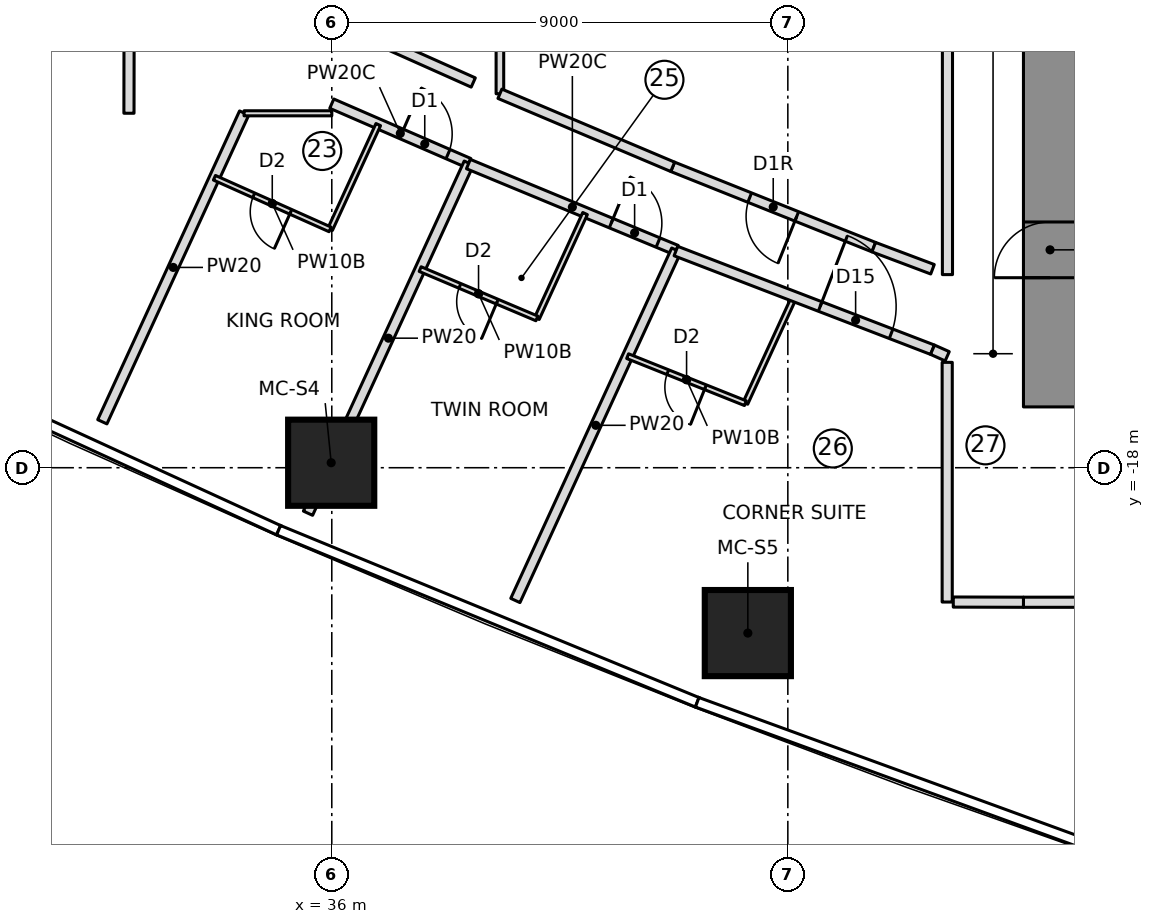
"""IFC4 building model, lengths in metres.
Left out: names, types, materials, properties, quantities, classifications, styles, units other than length and angle.
Written with IfcOpenShell. Run it as: python <this file> out.ifc"""

import sys

from ifc_helpers import new_model, si_unit, direction, frame, frame_2d, origin, origin_2d, place, context, subcontext, project, spatial, rectangle, extrude, element, fill, save


model = new_model("IFC4")
c1 = context("Model", 3, precision=1e-05, world=origin(), true_north=direction((0.0, 1.0)))
c2 = subcontext(c1, "Body", "Model", "MODEL_VIEW")
j1 = project(units=[si_unit("LENGTHUNIT", "METRE"), si_unit("PLANEANGLEUNIT", "RADIAN")], contexts=[c1])
p1 = place(None, origin())
s1 = spatial("IfcSite", under=j1, at=p1, CompositionType="ELEMENT")
p2 = place(p1, origin())
s2 = spatial("IfcBuilding", under=s1, at=p2, CompositionType="ELEMENT")
p3 = place(p2, frame((0.0, 0.0, 84.9)))
s3 = spatial("IfcBuildingStorey", under=s2, at=p3, CompositionType="ELEMENT", Elevation=84.9)
p4 = place(p3, frame((50.175, -16.8, 0.0), z_axis=(0.0, 0.0, 1.0), x_axis=(0.0, 1.0, 0.0)))
e1 = element("IfcWall", 1, at=p4, inside=s3, PredefinedType="SHEAR", context=c2, shape_type="SweptSolid", body=[
    extrude(rectangle(XDim=10.15, YDim=1.05, at=frame_2d((5.075, 0.0))), origin(), (0.0, 0.0, 1.0), 3.55),
])
p5 = place(p4, frame((2.55, 0.0, 0.0)))
e2 = element("IfcOpeningElement", 2, at=p5, cuts=e1, PredefinedType="OPENING", context=c2, shape_type="SweptSolid", body=[
    extrude(rectangle(XDim=1.1, YDim=2.1, at=frame_2d((0.55, 1.05))), frame((0.0, 0.535, 0.0), z_axis=(0.0, -1.0, 0.0), x_axis=(1.0, 0.0, 0.0)), (0.0, 0.0, 1.0), 1.07),
])
for number, where, z_axis, x_axis in (
    (3, (35.988, -17.902, 0.0), (0.0, 0.0, 1.0), (1.0, 0.0, 0.0)),
    (4, (44.211, -21.264, 0.0), (0.0, 0.0, 1.0), (1.0, 0.0, 0.0)),
):
    element("IfcColumn", number, at=place(p3, frame(where, z_axis=z_axis, x_axis=x_axis)), inside=s3, PredefinedType="COLUMN", context=c2, shape_type="SweptSolid", body=[
        extrude(rectangle(XDim=1.7, YDim=1.7, at=origin_2d()), origin(), (0.0, 0.0, 1.0), 3.55),
    ])
p6 = place(p3, frame((31.471, -17.094, 0.0), z_axis=(0.0, 0.0, 1.0), x_axis=(0.417420546123, 0.908713424394, 0.0)))
e5 = element("IfcWall", 5, at=p6, inside=s3, PredefinedType="PARTITIONING", context=c2, shape_type="SweptSolid", body=[
    extrude(rectangle(XDim=6.706, YDim=0.2, at=frame_2d((3.353, 0.0))), origin(), (0.0, 0.0, 1.0), 3.25),
])
p7 = place(p3, frame((36.0, -10.815, 0.0), z_axis=(0.0, 0.0, 1.0), x_axis=(0.917314766234, -0.398162805457, 0.0)))
e6 = element("IfcWall", 6, at=p7, inside=s3, PredefinedType="PARTITIONING", context=c2, shape_type="SweptSolid", body=[
    extrude(rectangle(XDim=2.948, YDim=0.2, at=frame_2d((1.474, 0.0))), origin(), (0.0, 0.0, 1.0), 3.25),
])
p8 = place(p7, frame((1.5, 0.0, 0.0)))
e7 = element("IfcOpeningElement", 7, at=p8, cuts=e6, PredefinedType="OPENING", context=c2, shape_type="SweptSolid", body=[
    extrude(rectangle(XDim=1.0, YDim=2.1, at=frame_2d((0.5, 1.05))), frame((0.0, 0.11, 0.0), z_axis=(0.0, -1.0, 0.0), x_axis=(1.0, 0.0, 0.0)), (0.0, 0.0, 1.0), 0.22),
])
p9 = place(p3, frame((36.917, -11.228, 0.0), z_axis=(0.0, 0.0, 1.0), x_axis=(-0.417378147321, -0.908732899228, 0.0)))
e8 = element("IfcWall", 8, at=p9, inside=s3, PredefinedType="PARTITIONING", context=c2, shape_type="SweptSolid", body=[
    extrude(rectangle(XDim=2.277, YDim=0.1, at=frame_2d((1.139, 0.0))), origin(), (0.0, 0.0, 1.0), 3.25),
])
p10 = place(p3, frame((35.967, -13.297, 0.0), z_axis=(0.0, 0.0, 1.0), x_axis=(-0.913016449487, 0.407922741417, 0.0)))
e9 = element("IfcWall", 9, at=p10, inside=s3, PredefinedType="PARTITIONING", context=c2, shape_type="SweptSolid", body=[
    extrude(rectangle(XDim=2.5, YDim=0.1, at=frame_2d((1.25, 0.0))), origin(), (0.0, 0.0, 1.0), 3.25),
])
p11 = place(p10, frame((0.85, 0.0, 0.0)))
e10 = element("IfcOpeningElement", 10, at=p11, cuts=e9, PredefinedType="OPENING", context=c2, shape_type="SweptSolid", body=[
    extrude(rectangle(XDim=0.8, YDim=2.1, at=frame_2d((0.4, 1.05))), frame((0.0, 0.06, 0.0), z_axis=(0.0, -1.0, 0.0), x_axis=(1.0, 0.0, 0.0)), (0.0, 0.0, 1.0), 0.12),
])
p12 = place(p3, frame((35.531, -18.898, 0.0), z_axis=(0.0, 0.0, 1.0), x_axis=(0.417416334044, 0.908715359215, 0.0)))
e11 = element("IfcWall", 11, at=p12, inside=s3, PredefinedType="PARTITIONING", context=c2, shape_type="SweptSolid", body=[
    extrude(rectangle(XDim=7.604, YDim=0.2, at=frame_2d((3.802, 0.0))), origin(), (0.0, 0.0, 1.0), 3.25),
])
p13 = place(p3, frame((38.696, -12.007, 0.0), z_axis=(0.0, 0.0, 1.0), x_axis=(0.923970612896, -0.382463470811, 0.0)))
e12 = element("IfcWall", 12, at=p13, inside=s3, PredefinedType="PARTITIONING", context=c2, shape_type="SweptSolid", body=[
    extrude(rectangle(XDim=4.441, YDim=0.2, at=frame_2d((2.22, 0.0))), origin(), (0.0, 0.0, 1.0), 3.25),
])
p14 = place(p13, frame((3.05, 0.0, 0.0)))
e13 = element("IfcOpeningElement", 13, at=p14, cuts=e12, PredefinedType="OPENING", context=c2, shape_type="SweptSolid", body=[
    extrude(rectangle(XDim=1.0, YDim=2.1, at=frame_2d((0.5, 1.05))), frame((0.0, 0.11, 0.0), z_axis=(0.0, -1.0, 0.0), x_axis=(1.0, 0.0, 0.0)), (0.0, 0.0, 1.0), 0.22),
])
p15 = place(p3, frame((40.999, -12.984, 0.0), z_axis=(0.0, 0.0, 1.0), x_axis=(-0.417433204355, -0.908707609686, 0.0)))
e14 = element("IfcWall", 14, at=p15, inside=s3, PredefinedType="PARTITIONING", context=c2, shape_type="SweptSolid", body=[
    extrude(rectangle(XDim=2.278, YDim=0.1, at=frame_2d((1.139, 0.0))), origin(), (0.0, 0.0, 1.0), 3.25),
])
p16 = place(p3, frame((40.048, -15.054, 0.0), z_axis=(0.0, 0.0, 1.0), x_axis=(-0.921042675983, 0.38946166566, 0.0)))
e15 = element("IfcWall", 15, at=p16, inside=s3, PredefinedType="PARTITIONING", context=c2, shape_type="SweptSolid", body=[
    extrude(rectangle(XDim=2.501, YDim=0.1, at=frame_2d((1.25, 0.0))), origin(), (0.0, 0.0, 1.0), 3.25),
])
p17 = place(p16, frame((0.85, 0.0, 0.0)))
e16 = element("IfcOpeningElement", 16, at=p17, cuts=e15, PredefinedType="OPENING", context=c2, shape_type="SweptSolid", body=[
    extrude(rectangle(XDim=0.8, YDim=2.1, at=frame_2d((0.4, 1.05))), frame((0.0, 0.06, 0.0), z_axis=(0.0, -1.0, 0.0), x_axis=(1.0, 0.0, 0.0)), (0.0, 0.0, 1.0), 0.12),
])
p18 = place(p3, frame((39.623, -20.62, 0.0), z_axis=(0.0, 0.0, 1.0), x_axis=(0.417427858403, 0.908710065438, 0.0)))
e17 = element("IfcWall", 17, at=p18, inside=s3, PredefinedType="PARTITIONING", context=c2, shape_type="SweptSolid", body=[
    extrude(rectangle(XDim=7.61, YDim=0.2, at=frame_2d((3.805, 0.0))), origin(), (0.0, 0.0, 1.0), 3.25),
])
p19 = place(p3, frame((45.114, -14.655, 0.0), z_axis=(0.0, 0.0, 1.0), x_axis=(-0.417373525971, -0.908735021785, 0.0)))
e18 = element("IfcWall", 18, at=p19, inside=s3, PredefinedType="PARTITIONING", context=c2, shape_type="SweptSolid", body=[
    extrude(rectangle(XDim=2.28, YDim=0.1, at=frame_2d((1.14, 0.0))), origin(), (0.0, 0.0, 1.0), 3.25),
])
p20 = place(p3, frame((44.163, -16.727, 0.0), z_axis=(0.0, 0.0, 1.0), x_axis=(-0.928638024739, 0.370987087388, 0.0)))
e19 = element("IfcWall", 19, at=p20, inside=s3, PredefinedType="PARTITIONING", context=c2, shape_type="SweptSolid", body=[
    extrude(rectangle(XDim=2.503, YDim=0.1, at=frame_2d((1.252, 0.0))), origin(), (0.0, 0.0, 1.0), 3.25),
])
p21 = place(p20, frame((0.85, 0.0, 0.0)))
e20 = element("IfcOpeningElement", 20, at=p21, cuts=e19, PredefinedType="OPENING", context=c2, shape_type="SweptSolid", body=[
    extrude(rectangle(XDim=0.8, YDim=2.1, at=frame_2d((0.4, 1.05))), frame((0.0, 0.06, 0.0), z_axis=(0.0, -1.0, 0.0), x_axis=(1.0, 0.0, 0.0)), (0.0, 0.0, 1.0), 0.12),
])
p22 = place(p3, frame((38.792, -10.397, 0.0), z_axis=(0.0, 0.0, 1.0), x_axis=(-0.913029587861, 0.407893333716, 0.0)))
e21 = element("IfcWall", 21, at=p22, inside=s3, PredefinedType="PARTITIONING", context=c2, shape_type="SweptSolid", body=[
    extrude(rectangle(XDim=3.058, YDim=0.2, at=frame_2d((1.529, 0.0))), origin(), (0.0, 0.0, 1.0), 3.25),
])
p23 = place(p3, frame((39.318, -10.619, 0.0), z_axis=(0.0, 0.0, 1.0), x_axis=(0.0, 1.0, 0.0)))
e22 = element("IfcWall", 22, at=p23, inside=s3, PredefinedType="PARTITIONING", context=c2, shape_type="SweptSolid", body=[
    extrude(rectangle(XDim=21.239, YDim=0.15, at=frame_2d((10.619, 0.0))), origin(), (0.0, 0.0, 1.0), 3.25),
])
p24 = place(p3, frame((46.696, -13.647, 0.0), z_axis=(0.0, 0.0, 1.0), x_axis=(-0.928638161177, 0.370986745864, 0.0)))
e23 = element("IfcWall", 23, at=p24, inside=s3, PredefinedType="PARTITIONING", context=c2, shape_type="SweptSolid", body=[
    extrude(rectangle(XDim=4.273, YDim=0.2, at=frame_2d((2.136, 0.0))), origin(), (0.0, 0.0, 1.0), 3.25),
])
p25 = place(p24, frame((1.636, 0.0, 0.0)))
e24 = element("IfcOpeningElement", 24, at=p25, cuts=e23, PredefinedType="OPENING", context=c2, shape_type="SweptSolid", body=[
    extrude(rectangle(XDim=1.0, YDim=2.1, at=frame_2d((0.5, 1.05))), frame((0.0, 0.11, 0.0), z_axis=(0.0, -1.0, 0.0), x_axis=(1.0, 0.0, 0.0)), (0.0, 0.0, 1.0), 0.22),
])
p26 = place(p3, frame((42.728, -12.062, 0.0), z_axis=(0.0, 0.0, 1.0), x_axis=(-0.92101730011, 0.389521671923, 0.0)))
e25 = element("IfcWall", 25, at=p26, inside=s3, PredefinedType="PARTITIONING", context=c2, shape_type="SweptSolid", body=[
    extrude(rectangle(XDim=3.702, YDim=0.2, at=frame_2d((1.851, 0.0))), origin(), (0.0, 0.0, 1.0), 3.25),
])
p27 = place(p3, frame((49.65, -20.655, 0.0), z_axis=(0.0, 0.0, 1.0), x_axis=(1.0, 0.0, 0.0)))
e26 = element("IfcWall", 26, at=p27, inside=s3, PredefinedType="PARTITIONING", context=c2, shape_type="SweptSolid", body=[
    extrude(rectangle(XDim=4.976, YDim=0.2, at=frame_2d((2.488, 0.0))), origin(), (0.0, 0.0, 1.0), 3.25),
])
p28 = place(p27, frame((1.988, 0.0, 0.0)))
e27 = element("IfcOpeningElement", 27, at=p28, cuts=e26, PredefinedType="OPENING", context=c2, shape_type="SweptSolid", body=[
    extrude(rectangle(XDim=1.5, YDim=2.1, at=frame_2d((0.75, 1.05))), frame((0.0, 0.11, 0.0), z_axis=(0.0, -1.0, 0.0), x_axis=(1.0, 0.0, 0.0)), (0.0, 0.0, 1.0), 0.22),
])
p29 = place(p3, frame((34.268, -11.005, 0.0), z_axis=(0.0, 0.0, 1.0), x_axis=(1.0, 0.0, 0.0)))
e28 = element("IfcWall", 28, at=p29, inside=s3, PredefinedType="PARTITIONING", context=c2, shape_type="SweptSolid", body=[
    extrude(rectangle(XDim=1.732, YDim=0.1, at=frame_2d((0.866, 0.0))), origin(), (0.0, 0.0, 1.0), 3.25),
])
p30 = place(p3, frame((42.791, -13.724, 0.0), z_axis=(0.0, 0.0, 1.0), x_axis=(0.933356043573, -0.358951940969, 0.0)))
e29 = element("IfcWall", 29, at=p30, inside=s3, PredefinedType="PARTITIONING", context=c2, shape_type="SweptSolid", body=[
    extrude(rectangle(XDim=5.426, YDim=0.2, at=frame_2d((2.713, 0.0))), origin(), (0.0, 0.0, 1.0), 3.25),
])
p31 = place(p30, frame((3.05, 0.0, 0.0)))
e30 = element("IfcOpeningElement", 30, at=p31, cuts=e29, PredefinedType="OPENING", context=c2, shape_type="SweptSolid", body=[
    extrude(rectangle(XDim=1.5, YDim=2.1, at=frame_2d((0.75, 1.05))), frame((0.0, 0.11, 0.0), z_axis=(0.0, -1.0, 0.0), x_axis=(1.0, 0.0, 0.0)), (0.0, 0.0, 1.0), 0.22),
])
p32 = place(p3, frame((47.855, -14.083, 0.0), z_axis=(0.0, 0.0, 1.0), x_axis=(-0.935907269358, 0.352246480696, 0.0)))
e31 = element("IfcWall", 31, at=p32, inside=s3, PredefinedType="PARTITIONING", context=c2, shape_type="SweptSolid", body=[
    extrude(rectangle(XDim=1.239, YDim=0.2, at=frame_2d((0.619, 0.0))), origin(), (0.0, 0.0, 1.0), 3.25),
])
p33 = place(p3, frame((48.15, 14.189, 0.0), z_axis=(0.0, 0.0, 1.0), x_axis=(0.0, -1.0, 0.0)))
e32 = element("IfcWall", 32, at=p33, inside=s3, PredefinedType="PARTITIONING", context=c2, shape_type="SweptSolid", body=[
    extrude(rectangle(XDim=28.377, YDim=0.2, at=frame_2d((14.189, 0.0))), origin(), (0.0, 0.0, 1.0), 3.25),
])
p34 = place(p3, frame((32.0, -8.951, 0.0), z_axis=(0.0, 0.0, 1.0), x_axis=(-0.001307965587, -0.999999144613, 0.0)))
e33 = element("IfcWall", 33, at=p34, inside=s3, PredefinedType="PARTITIONING", context=c2, shape_type="SweptSolid", body=[
    extrude(rectangle(XDim=2.053, YDim=0.2, at=frame_2d((1.027, 0.0))), origin(), (0.0, 0.0, 1.0), 3.25),
])
p35 = place(p3, frame((47.855, -15.671, 0.0), z_axis=(0.0, 0.0, 1.0), x_axis=(0.91336751773, -0.407136067617, 0.0)))
e34 = element("IfcWall", 34, at=p35, inside=s3, PredefinedType="PARTITIONING", context=c2, shape_type="SweptSolid", body=[
    extrude(rectangle(XDim=0.318, YDim=0.2, at=frame_2d((0.159, 0.0))), origin(), (0.0, 0.0, 1.0), 3.25),
])
p36 = place(p3, frame((48.145, -15.92, 0.0), z_axis=(0.0, 0.0, 1.0), x_axis=(-5.1610239e-05, -0.999999998668, 0.0)))
e35 = element("IfcWall", 35, at=p36, inside=s3, PredefinedType="PARTITIONING", context=c2, shape_type="SweptSolid", body=[
    extrude(rectangle(XDim=4.73, YDim=0.2, at=frame_2d((2.365, 0.0))), origin(), (0.0, 0.0, 1.0), 3.25),
])
p37 = place(p3, frame((48.265, -20.651, 0.0), z_axis=(0.0, 0.0, 1.0), x_axis=(0.999996503144, -0.002644560569, 0.0)))
e36 = element("IfcWall", 36, at=p37, inside=s3, PredefinedType="PARTITIONING", context=c2, shape_type="SweptSolid", body=[
    extrude(rectangle(XDim=1.385, YDim=0.2, at=frame_2d((0.692, 0.0))), origin(), (0.0, 0.0, 1.0), 3.25),
])
p38 = place(p11, origin())
e37 = element("IfcDoor", 37, at=p38, inside=s3, OperationType="SINGLE_SWING_LEFT", PredefinedType="DOOR", context=c2, shape_type="SweptSolid", body=[
    extrude(rectangle(XDim=0.8, YDim=2.1, at=frame_2d((0.4, 1.05))), frame((0.0, 0.025, 0.0), z_axis=(0.0, -1.0, 0.0), x_axis=(1.0, 0.0, 0.0)), (0.0, 0.0, 1.0), 0.05),
])
fill(e10, e37)
p39 = place(p8, origin())
e38 = element("IfcDoor", 38, at=p39, inside=s3, OperationType="SINGLE_SWING_LEFT", PredefinedType="DOOR", context=c2, shape_type="SweptSolid", body=[
    extrude(rectangle(XDim=1.0, YDim=2.1, at=frame_2d((0.5, 1.05))), frame((0.0, 0.025, 0.0), z_axis=(0.0, -1.0, 0.0), x_axis=(1.0, 0.0, 0.0)), (0.0, 0.0, 1.0), 0.05),
])
fill(e7, e38)
p40 = place(p17, origin())
e39 = element("IfcDoor", 39, at=p40, inside=s3, OperationType="SINGLE_SWING_LEFT", PredefinedType="DOOR", context=c2, shape_type="SweptSolid", body=[
    extrude(rectangle(XDim=0.8, YDim=2.1, at=frame_2d((0.4, 1.05))), frame((0.0, 0.025, 0.0), z_axis=(0.0, -1.0, 0.0), x_axis=(1.0, 0.0, 0.0)), (0.0, 0.0, 1.0), 0.05),
])
fill(e16, e39)
p41 = place(p14, origin())
e40 = element("IfcDoor", 40, at=p41, inside=s3, OperationType="SINGLE_SWING_LEFT", PredefinedType="DOOR", context=c2, shape_type="SweptSolid", body=[
    extrude(rectangle(XDim=1.0, YDim=2.1, at=frame_2d((0.5, 1.05))), frame((0.0, 0.025, 0.0), z_axis=(0.0, -1.0, 0.0), x_axis=(1.0, 0.0, 0.0)), (0.0, 0.0, 1.0), 0.05),
])
fill(e13, e40)
p42 = place(p21, origin())
e41 = element("IfcDoor", 41, at=p42, inside=s3, OperationType="SINGLE_SWING_LEFT", PredefinedType="DOOR", context=c2, shape_type="SweptSolid", body=[
    extrude(rectangle(XDim=0.8, YDim=2.1, at=frame_2d((0.4, 1.05))), frame((0.0, 0.025, 0.0), z_axis=(0.0, -1.0, 0.0), x_axis=(1.0, 0.0, 0.0)), (0.0, 0.0, 1.0), 0.05),
])
fill(e20, e41)
p43 = place(p31, origin())
e42 = element("IfcDoor", 42, at=p43, inside=s3, OperationType="DOUBLE_DOOR_SINGLE_SWING", PredefinedType="DOOR", context=c2, shape_type="SweptSolid", body=[
    extrude(rectangle(XDim=1.5, YDim=2.1, at=frame_2d((0.75, 1.05))), frame((0.0, 0.025, 0.0), z_axis=(0.0, -1.0, 0.0), x_axis=(1.0, 0.0, 0.0)), (0.0, 0.0, 1.0), 0.05),
])
fill(e30, e42)
p44 = place(p25, origin())
e43 = element("IfcDoor", 43, at=p44, inside=s3, OperationType="SINGLE_SWING_RIGHT", PredefinedType="DOOR", context=c2, shape_type="SweptSolid", body=[
    extrude(rectangle(XDim=1.0, YDim=2.1, at=frame_2d((0.5, 1.05))), frame((0.0, 0.025, 0.0), z_axis=(0.0, -1.0, 0.0), x_axis=(1.0, 0.0, 0.0)), (0.0, 0.0, 1.0), 0.05),
])
fill(e24, e43)
p45 = place(p5, origin())
e44 = element("IfcDoor", 44, at=p45, inside=s3, OperationType="SINGLE_SWING_RIGHT", PredefinedType="DOOR", context=c2, shape_type="SweptSolid", body=[
    extrude(rectangle(XDim=1.1, YDim=2.1, at=frame_2d((0.55, 1.05))), frame((0.0, 0.025, 0.0), z_axis=(0.0, -1.0, 0.0), x_axis=(1.0, 0.0, 0.0)), (0.0, 0.0, 1.0), 0.05),
])
fill(e2, e44)
save(model, sys.argv[1])
